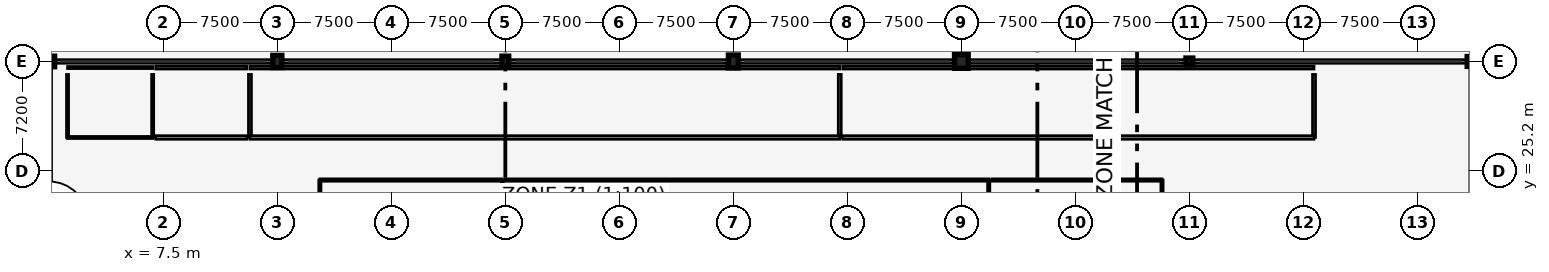
"""IFC4 building model, lengths in metres.
Left out: names, types, materials, properties, quantities, classifications, styles, units other than length and angle.
Written with IfcOpenShell. Run it as: python <this file> out.ifc"""

import sys

from ifc_helpers import new_model, si_unit, direction, frame, frame_2d, origin, origin_2d, place, context, subcontext, project, spatial, rectangle, extrude, element, fill, save


model = new_model("IFC4")
c1 = context("Model", 3, precision=1e-05, world=origin(), true_north=direction((0.0, 1.0)))
c2 = subcontext(c1, "Body", "Model", "MODEL_VIEW")
j1 = project(units=[si_unit("LENGTHUNIT", "METRE"), si_unit("PLANEANGLEUNIT", "RADIAN")], contexts=[c1])
p1 = place(None, origin())
s1 = spatial("IfcSite", under=j1, at=p1, CompositionType="ELEMENT")
p2 = place(p1, origin())
s2 = spatial("IfcBuilding", under=s1, at=p2, CompositionType="ELEMENT")
p3 = place(p2, frame((0.0, 0.0, 4.8)))
s3 = spatial("IfcBuildingStorey", under=s2, at=p3, CompositionType="ELEMENT", Elevation=4.8)
p4 = place(p3, frame((0.0, 32.4, 0.0), z_axis=(0.0, 0.0, 1.0), x_axis=(1.0, 0.0, 0.0)))
e1 = element("IfcColumn", 1, at=p4, inside=s3, PredefinedType="COLUMN", context=c2, shape_type="SweptSolid", body=[
    extrude(rectangle(XDim=0.7, YDim=0.7, at=origin_2d()), origin(), (0.0, 0.0, 1.0), 4.2),
])
p5 = place(p3, frame((15.0, 32.4, 0.0), z_axis=(0.0, 0.0, 1.0), x_axis=(1.0, 0.0, 0.0)))
e2 = element("IfcColumn", 2, at=p5, inside=s3, PredefinedType="COLUMN", context=c2, shape_type="SweptSolid", body=[
    extrude(rectangle(XDim=0.6, YDim=0.8, at=origin_2d()), origin(), (0.0, 0.0, 1.0), 4.2),
])
p6 = place(p3, frame((30.0, 32.4, 0.0), z_axis=(0.0, 0.0, 1.0), x_axis=(1.0, 0.0, 0.0)))
e3 = element("IfcColumn", 3, at=p6, inside=s3, PredefinedType="COLUMN", context=c2, shape_type="SweptSolid", body=[
    extrude(rectangle(XDim=0.45, YDim=0.7, at=origin_2d()), origin(), (0.0, 0.0, 1.0), 4.2),
])
p7 = place(p3, frame((45.0, 32.4, 0.0), z_axis=(0.0, 0.0, 1.0), x_axis=(1.0, 0.0, 0.0)))
e4 = element("IfcColumn", 4, at=p7, inside=s3, PredefinedType="COLUMN", context=c2, shape_type="SweptSolid", body=[
    extrude(rectangle(XDim=0.65, YDim=0.85, at=origin_2d()), origin(), (0.0, 0.0, 1.0), 4.2),
])
p8 = place(p3, frame((60.0, 32.4, 0.0), z_axis=(0.0, 0.0, 1.0), x_axis=(1.0, 0.0, 0.0)))
e5 = element("IfcColumn", 5, at=p8, inside=s3, PredefinedType="COLUMN", context=c2, shape_type="SweptSolid", body=[
    extrude(rectangle(XDim=0.9, YDim=0.9, at=origin_2d()), origin(), (0.0, 0.0, 1.0), 4.2),
])
p9 = place(p3, frame((75.0, 32.4, 0.0), z_axis=(0.0, 0.0, 1.0), x_axis=(1.0, 0.0, 0.0)))
e6 = element("IfcColumn", 6, at=p9, inside=s3, PredefinedType="COLUMN", context=c2, shape_type="SweptSolid", body=[
    extrude(rectangle(XDim=0.45, YDim=0.45, at=origin_2d()), origin(), (0.0, 0.0, 1.0), 4.2),
])
p10 = place(p3, frame((93.6, 32.4, 0.0), z_axis=(0.0, 0.0, 1.0), x_axis=(1.0, 0.0, 0.0)))
e7 = element("IfcColumn", 7, at=p10, inside=s3, PredefinedType="COLUMN", context=c2, shape_type="SweptSolid", body=[
    extrude(rectangle(XDim=0.65, YDim=0.65, at=origin_2d()), origin(), (0.0, 0.0, 1.0), 4.2),
])
p11 = place(p3, frame((0.0, 32.4, 0.0), z_axis=(0.0, 0.0, 1.0), x_axis=(1.0, 0.0, 0.0)))
e8 = element("IfcWall", 8, at=p11, inside=s3, PredefinedType="PARAPET", context=c2, shape_type="SweptSolid", body=[
    extrude(rectangle(XDim=45.0, YDim=0.24, at=frame_2d((22.5, 0.0))), origin(), (0.0, 0.0, 1.0), 1.15),
])
p12 = place(p3, frame((45.0, 32.4, 0.0), z_axis=(0.0, 0.0, 1.0), x_axis=(1.0, 0.0, 0.0)))
e9 = element("IfcWall", 9, at=p12, inside=s3, PredefinedType="PARAPET", context=c2, shape_type="SweptSolid", body=[
    extrude(rectangle(XDim=48.6, YDim=0.24, at=frame_2d((24.3, 0.0))), origin(), (0.0, 0.0, 1.0), 1.15),
])
p13 = place(p3, frame((29.8, 11.85, 0.0), z_axis=(0.0, 0.0, 1.0), x_axis=(0.0, 1.0, 0.0)))
e10 = element("IfcWall", 10, at=p13, inside=s3, PredefinedType="PARTITIONING", context=c2, shape_type="SweptSolid", body=[
    extrude(rectangle(XDim=12.75, YDim=0.15, at=frame_2d((6.375, 0.0))), origin(), (0.0, 0.0, 1.0), 3.082),
])
p14 = place(p3, frame((17.8, 24.6, 0.0), z_axis=(0.0, 0.0, 1.0), x_axis=(0.0, -1.0, 0.0)))
e11 = element("IfcWall", 11, at=p14, inside=s3, PredefinedType="PARTITIONING", context=c2, shape_type="SweptSolid", body=[
    extrude(rectangle(XDim=12.75, YDim=0.15, at=frame_2d((6.375, 0.0))), origin(), (0.0, 0.0, 1.0), 3.6),
])
p15 = place(p3, frame((17.8, 24.6, 0.0), z_axis=(0.0, 0.0, 1.0), x_axis=(1.0, 0.0, 0.0)))
e12 = element("IfcWall", 12, at=p15, inside=s3, PredefinedType="PARTITIONING", context=c2, shape_type="SweptSolid", body=[
    extrude(rectangle(XDim=12.0, YDim=0.16, at=frame_2d((6.0, 0.0))), origin(), (0.0, 0.0, 1.0), 3.6),
])
p16 = place(p15, frame((5.0, 0.0, 0.0)))
e13 = element("IfcOpeningElement", 13, at=p16, cuts=e12, PredefinedType="OPENING", context=c2, shape_type="SweptSolid", body=[
    extrude(rectangle(XDim=2.0, YDim=2.3, at=frame_2d((1.0, 1.15))), frame((0.0, 0.09, 0.0), z_axis=(0.0, -1.0, 0.0), x_axis=(1.0, 0.0, 0.0)), (0.0, 0.0, 1.0), 0.18),
])
p17 = place(p3, frame((61.8, 11.85, 0.0), z_axis=(0.0, 0.0, 1.0), x_axis=(0.0, 1.0, 0.0)))
e14 = element("IfcWall", 14, at=p17, inside=s3, PredefinedType="PARTITIONING", context=c2, shape_type="SweptSolid", body=[
    extrude(rectangle(XDim=12.75, YDim=0.15, at=frame_2d((6.375, 0.0))), origin(), (0.0, 0.0, 1.0), 3.6),
])
p18 = place(p3, frame((30.0, 24.6, 0.0), z_axis=(0.0, 0.0, 1.0), x_axis=(1.0, 0.0, 0.0)))
e15 = element("IfcWall", 15, at=p18, inside=s3, PredefinedType="PARTITIONING", context=c2, shape_type="SweptSolid", body=[
    extrude(rectangle(XDim=31.8, YDim=0.16, at=frame_2d((15.9, 0.0))), origin(), (0.0, 0.0, 1.0), 3.082),
])
p19 = place(p18, frame((14.9, 0.0, 0.0)))
e16 = element("IfcOpeningElement", 16, at=p19, cuts=e15, PredefinedType="OPENING", context=c2, shape_type="SweptSolid", body=[
    extrude(rectangle(XDim=2.0, YDim=2.3, at=frame_2d((1.0, 1.15))), frame((0.0, 0.09, 0.0), z_axis=(0.0, -1.0, 0.0), x_axis=(1.0, 0.0, 0.0)), (0.0, 0.0, 1.0), 0.18),
])
p20 = place(p18, frame((26.6, 0.0, 0.0)))
e17 = element("IfcOpeningElement", 17, at=p20, cuts=e15, PredefinedType="OPENING", context=c2, shape_type="SweptSolid", body=[
    extrude(rectangle(XDim=2.0, YDim=2.3, at=frame_2d((1.0, 1.15))), frame((0.0, 0.09, 0.0), z_axis=(0.0, -1.0, 0.0), x_axis=(1.0, 0.0, 0.0)), (0.0, 0.0, 1.0), 0.18),
])
p21 = place(p3, frame((73.2, 11.85, 0.0), z_axis=(0.0, 0.0, 1.0), x_axis=(0.0, 1.0, 0.0)))
e18 = element("IfcWall", 18, at=p21, inside=s3, PredefinedType="PARTITIONING", context=c2, shape_type="SweptSolid", body=[
    extrude(rectangle(XDim=12.75, YDim=0.15, at=frame_2d((6.375, 0.0))), origin(), (0.0, 0.0, 1.0), 3.6),
])
p22 = place(p3, frame((62.0, 24.6, 0.0), z_axis=(0.0, 0.0, 1.0), x_axis=(1.0, 0.0, 0.0)))
e19 = element("IfcWall", 19, at=p22, inside=s3, PredefinedType="PARTITIONING", context=c2, shape_type="SweptSolid", body=[
    extrude(rectangle(XDim=11.2, YDim=0.16, at=frame_2d((5.6, 0.0))), origin(), (0.0, 0.0, 1.0), 3.6),
])
p23 = place(p22, frame((4.6, 0.0, 0.0)))
e20 = element("IfcOpeningElement", 20, at=p23, cuts=e19, PredefinedType="OPENING", context=c2, shape_type="SweptSolid", body=[
    extrude(rectangle(XDim=2.0, YDim=2.3, at=frame_2d((1.0, 1.15))), frame((0.0, 0.09, 0.0), z_axis=(0.0, -1.0, 0.0), x_axis=(1.0, 0.0, 0.0)), (0.0, 0.0, 1.0), 0.18),
])
p24 = place(p3, frame((13.2, 32.0, 0.0), z_axis=(0.0, 0.0, 1.0), x_axis=(1.0, 0.0, 0.0)))
e21 = element("IfcWall", 21, at=p24, inside=s3, PredefinedType="SOLIDWALL", context=c2, shape_type="SweptSolid", body=[
    extrude(rectangle(XDim=38.8, YDim=0.2, at=frame_2d((19.4, 0.0))), origin(), (0.0, 0.0, 1.0), 3.082),
])
for number, where, z_axis, x_axis in (
    (22, (52.0, 27.4, 0.0), (0.0, 0.0, 1.0), (0.0, 1.0, 0.0)),
    (23, (13.2, 31.55, 0.0), (0.0, 0.0, 1.0), (0.0, -1.0, 0.0)),
):
    element("IfcWall", number, at=place(p3, frame(where, z_axis=z_axis, x_axis=x_axis)), inside=s3, PredefinedType="SOLIDWALL", context=c2, shape_type="SweptSolid", body=[
        extrude(rectangle(XDim=4.15, YDim=0.2, at=frame_2d((2.075, 0.0))), origin(), (0.0, 0.0, 1.0), 3.6),
    ])
p25 = place(p3, frame((52.0, 27.4, 0.0), z_axis=(0.0, 0.0, 1.0), x_axis=(-1.0, 0.0, 0.0)))
e24 = element("IfcWall", 24, at=p25, inside=s3, PredefinedType="SOLIDWALL", context=c2, shape_type="SweptSolid", body=[
    extrude(rectangle(XDim=38.8, YDim=0.24, at=frame_2d((19.4, 0.0))), origin(), (0.0, 0.0, 1.0), 3.082),
])
p26 = place(p25, frame((18.6, 0.0, 0.0)))
e25 = element("IfcOpeningElement", 25, at=p26, cuts=e24, PredefinedType="OPENING", context=c2, shape_type="SweptSolid", body=[
    extrude(rectangle(XDim=1.6, YDim=2.15, at=frame_2d((0.8, 1.075))), frame((0.0, 0.13, 0.0), z_axis=(0.0, -1.0, 0.0), x_axis=(1.0, 0.0, 0.0)), (0.0, 0.0, 1.0), 0.26),
])
p27 = place(p25, frame((34.0, 0.0, 0.0)))
e26 = element("IfcOpeningElement", 26, at=p27, cuts=e24, PredefinedType="OPENING", context=c2, shape_type="SweptSolid", body=[
    extrude(rectangle(XDim=1.6, YDim=2.15, at=frame_2d((0.8, 1.075))), frame((0.0, 0.13, 0.0), z_axis=(0.0, -1.0, 0.0), x_axis=(1.0, 0.0, 0.0)), (0.0, 0.0, 1.0), 0.26),
])
p28 = place(p3, frame((52.2, 32.0, 0.0), z_axis=(0.0, 0.0, 1.0), x_axis=(1.0, 0.0, 0.0)))
e27 = element("IfcWall", 27, at=p28, inside=s3, PredefinedType="SOLIDWALL", context=c2, shape_type="SweptSolid", body=[
    extrude(rectangle(XDim=31.0, YDim=0.2, at=frame_2d((15.5, 0.0))), origin(), (0.0, 0.0, 1.0), 3.082),
])
p29 = place(p3, frame((83.2, 27.4, 0.0), z_axis=(0.0, 0.0, 1.0), x_axis=(0.0, 1.0, 0.0)))
e28 = element("IfcWall", 28, at=p29, inside=s3, PredefinedType="SOLIDWALL", context=c2, shape_type="SweptSolid", body=[
    extrude(rectangle(XDim=4.15, YDim=0.2, at=frame_2d((2.075, 0.0))), origin(), (0.0, 0.0, 1.0), 3.6),
])
p30 = place(p3, frame((83.2, 27.4, 0.0), z_axis=(0.0, 0.0, 1.0), x_axis=(-1.0, 0.0, 0.0)))
e29 = element("IfcWall", 29, at=p30, inside=s3, PredefinedType="SOLIDWALL", context=c2, shape_type="SweptSolid", body=[
    extrude(rectangle(XDim=31.0, YDim=0.24, at=frame_2d((15.5, 0.0))), origin(), (0.0, 0.0, 1.0), 3.082),
])
p31 = place(p30, frame((14.7, 0.0, 0.0)))
e30 = element("IfcOpeningElement", 30, at=p31, cuts=e29, PredefinedType="OPENING", context=c2, shape_type="SweptSolid", body=[
    extrude(rectangle(XDim=1.6, YDim=2.15, at=frame_2d((0.8, 1.075))), frame((0.0, 0.13, 0.0), z_axis=(0.0, -1.0, 0.0), x_axis=(1.0, 0.0, 0.0)), (0.0, 0.0, 1.0), 0.26),
])
p32 = place(p30, frame((26.2, 0.0, 0.0)))
e31 = element("IfcOpeningElement", 31, at=p32, cuts=e29, PredefinedType="OPENING", context=c2, shape_type="SweptSolid", body=[
    extrude(rectangle(XDim=1.6, YDim=2.15, at=frame_2d((0.8, 1.075))), frame((0.0, 0.13, 0.0), z_axis=(0.0, -1.0, 0.0), x_axis=(1.0, 0.0, 0.0)), (0.0, 0.0, 1.0), 0.26),
])
p33 = place(p3, frame((1.2, 32.0, 0.0), z_axis=(0.0, 0.0, 1.0), x_axis=(1.0, 0.0, 0.0)))
e32 = element("IfcWall", 32, at=p33, inside=s3, PredefinedType="PARTITIONING", context=c2, shape_type="SweptSolid", body=[
    extrude(rectangle(XDim=5.6, YDim=0.14, at=frame_2d((2.8, 0.0))), origin(), (0.0, 0.0, 1.0), 3.5),
])
for number, where, z_axis, x_axis in (
    (33, (6.8, 27.4, 0.0), (0.0, 0.0, 1.0), (0.0, 1.0, 0.0)),
    (34, (1.2, 31.55, 0.0), (0.0, 0.0, 1.0), (0.0, -1.0, 0.0)),
):
    element("IfcWall", number, at=place(p3, frame(where, z_axis=z_axis, x_axis=x_axis)), inside=s3, PredefinedType="PARTITIONING", context=c2, shape_type="SweptSolid", body=[
        extrude(rectangle(XDim=4.15, YDim=0.14, at=frame_2d((2.075, 0.0))), origin(), (0.0, 0.0, 1.0), 3.5),
    ])
p34 = place(p3, frame((6.8, 27.4, 0.0), z_axis=(0.0, 0.0, 1.0), x_axis=(-1.0, 0.0, 0.0)))
e35 = element("IfcWall", 35, at=p34, inside=s3, PredefinedType="PARTITIONING", context=c2, shape_type="SweptSolid", body=[
    extrude(rectangle(XDim=5.6, YDim=0.14, at=frame_2d((2.8, 0.0))), origin(), (0.0, 0.0, 1.0), 3.5),
])
p35 = place(p34, frame((2.31, 0.0, 0.0)))
e36 = element("IfcOpeningElement", 36, at=p35, cuts=e35, PredefinedType="OPENING", context=c2, shape_type="SweptSolid", body=[
    extrude(rectangle(XDim=0.98, YDim=2.15, at=frame_2d((0.49, 1.075))), frame((0.0, 0.08, 0.0), z_axis=(0.0, -1.0, 0.0), x_axis=(1.0, 0.0, 0.0)), (0.0, 0.0, 1.0), 0.16),
])
p36 = place(p3, frame((7.0, 32.0, 0.0), z_axis=(0.0, 0.0, 1.0), x_axis=(1.0, 0.0, 0.0)))
e37 = element("IfcWall", 37, at=p36, inside=s3, PredefinedType="SOLIDWALL", context=c2, shape_type="SweptSolid", body=[
    extrude(rectangle(XDim=6.0, YDim=0.2, at=frame_2d((3.0, 0.0))), origin(), (0.0, 0.0, 1.0), 3.5),
])
p37 = place(p3, frame((13.0, 27.4, 0.0), z_axis=(0.0, 0.0, 1.0), x_axis=(-1.0, 0.0, 0.0)))
e38 = element("IfcWall", 38, at=p37, inside=s3, PredefinedType="SOLIDWALL", context=c2, shape_type="SweptSolid", body=[
    extrude(rectangle(XDim=6.0, YDim=0.24, at=frame_2d((3.0, 0.0))), origin(), (0.0, 0.0, 1.0), 3.5),
])
p38 = place(p37, frame((2.2, 0.0, 0.0)))
e39 = element("IfcOpeningElement", 39, at=p38, cuts=e38, PredefinedType="OPENING", context=c2, shape_type="SweptSolid", body=[
    extrude(rectangle(XDim=1.6, YDim=2.15, at=frame_2d((0.8, 1.075))), frame((0.0, 0.13, 0.0), z_axis=(0.0, -1.0, 0.0), x_axis=(1.0, 0.0, 0.0)), (0.0, 0.0, 1.0), 0.26),
])
p39 = place(p16, origin())
e40 = element("IfcDoor", 40, at=p39, inside=s3, OperationType="DOUBLE_SWING_LEFT", PredefinedType="DOOR", context=c2, shape_type="SweptSolid", body=[
    extrude(rectangle(XDim=2.0, YDim=2.3, at=frame_2d((1.0, 1.15))), frame((0.0, 0.025, 0.0), z_axis=(0.0, -1.0, 0.0), x_axis=(1.0, 0.0, 0.0)), (0.0, 0.0, 1.0), 0.05),
])
fill(e13, e40)
p40 = place(p19, origin())
e41 = element("IfcDoor", 41, at=p40, inside=s3, OperationType="DOUBLE_SWING_LEFT", PredefinedType="DOOR", context=c2, shape_type="SweptSolid", body=[
    extrude(rectangle(XDim=2.0, YDim=2.3, at=frame_2d((1.0, 1.15))), frame((0.0, 0.025, 0.0), z_axis=(0.0, -1.0, 0.0), x_axis=(1.0, 0.0, 0.0)), (0.0, 0.0, 1.0), 0.05),
])
fill(e16, e41)
p41 = place(p20, origin())
e42 = element("IfcDoor", 42, at=p41, inside=s3, OperationType="DOUBLE_SWING_LEFT", PredefinedType="DOOR", context=c2, shape_type="SweptSolid", body=[
    extrude(rectangle(XDim=2.0, YDim=2.3, at=frame_2d((1.0, 1.15))), frame((0.0, 0.025, 0.0), z_axis=(0.0, -1.0, 0.0), x_axis=(1.0, 0.0, 0.0)), (0.0, 0.0, 1.0), 0.05),
])
fill(e17, e42)
p42 = place(p23, origin())
e43 = element("IfcDoor", 43, at=p42, inside=s3, OperationType="DOUBLE_SWING_LEFT", PredefinedType="DOOR", context=c2, shape_type="SweptSolid", body=[
    extrude(rectangle(XDim=2.0, YDim=2.3, at=frame_2d((1.0, 1.15))), frame((0.0, 0.025, 0.0), z_axis=(0.0, -1.0, 0.0), x_axis=(1.0, 0.0, 0.0)), (0.0, 0.0, 1.0), 0.05),
])
fill(e20, e43)
p43 = place(p26, origin())
e44 = element("IfcDoor", 44, at=p43, inside=s3, OperationType="DOUBLE_SWING_RIGHT", PredefinedType="DOOR", context=c2, shape_type="SweptSolid", body=[
    extrude(rectangle(XDim=1.6, YDim=2.15, at=frame_2d((0.8, 1.075))), frame((0.0, 0.025, 0.0), z_axis=(0.0, -1.0, 0.0), x_axis=(1.0, 0.0, 0.0)), (0.0, 0.0, 1.0), 0.05),
])
fill(e25, e44)
p44 = place(p27, origin())
e45 = element("IfcDoor", 45, at=p44, inside=s3, OperationType="DOUBLE_SWING_RIGHT", PredefinedType="DOOR", context=c2, shape_type="SweptSolid", body=[
    extrude(rectangle(XDim=1.6, YDim=2.15, at=frame_2d((0.8, 1.075))), frame((0.0, 0.025, 0.0), z_axis=(0.0, -1.0, 0.0), x_axis=(1.0, 0.0, 0.0)), (0.0, 0.0, 1.0), 0.05),
])
fill(e26, e45)
p45 = place(p31, origin())
e46 = element("IfcDoor", 46, at=p45, inside=s3, OperationType="DOUBLE_SWING_RIGHT", PredefinedType="DOOR", context=c2, shape_type="SweptSolid", body=[
    extrude(rectangle(XDim=1.6, YDim=2.15, at=frame_2d((0.8, 1.075))), frame((0.0, 0.025, 0.0), z_axis=(0.0, -1.0, 0.0), x_axis=(1.0, 0.0, 0.0)), (0.0, 0.0, 1.0), 0.05),
])
fill(e30, e46)
p46 = place(p32, origin())
e47 = element("IfcDoor", 47, at=p46, inside=s3, OperationType="DOUBLE_SWING_RIGHT", PredefinedType="DOOR", context=c2, shape_type="SweptSolid", body=[
    extrude(rectangle(XDim=1.6, YDim=2.15, at=frame_2d((0.8, 1.075))), frame((0.0, 0.025, 0.0), z_axis=(0.0, -1.0, 0.0), x_axis=(1.0, 0.0, 0.0)), (0.0, 0.0, 1.0), 0.05),
])
fill(e31, e47)
p47 = place(p35, origin())
e48 = element("IfcDoor", 48, at=p47, inside=s3, OperationType="SINGLE_SWING_LEFT", PredefinedType="DOOR", context=c2, shape_type="SweptSolid", body=[
    extrude(rectangle(XDim=0.98, YDim=2.15, at=frame_2d((0.49, 1.075))), frame((0.0, 0.025, 0.0), z_axis=(0.0, -1.0, 0.0), x_axis=(1.0, 0.0, 0.0)), (0.0, 0.0, 1.0), 0.05),
])
fill(e36, e48)
p48 = place(p38, origin())
e49 = element("IfcDoor", 49, at=p48, inside=s3, OperationType="DOUBLE_SWING_RIGHT", PredefinedType="DOOR", context=c2, shape_type="SweptSolid", body=[
    extrude(rectangle(XDim=1.6, YDim=2.15, at=frame_2d((0.8, 1.075))), frame((0.0, 0.025, 0.0), z_axis=(0.0, -1.0, 0.0), x_axis=(1.0, 0.0, 0.0)), (0.0, 0.0, 1.0), 0.05),
])
fill(e39, e49)
save(model, sys.argv[1])
